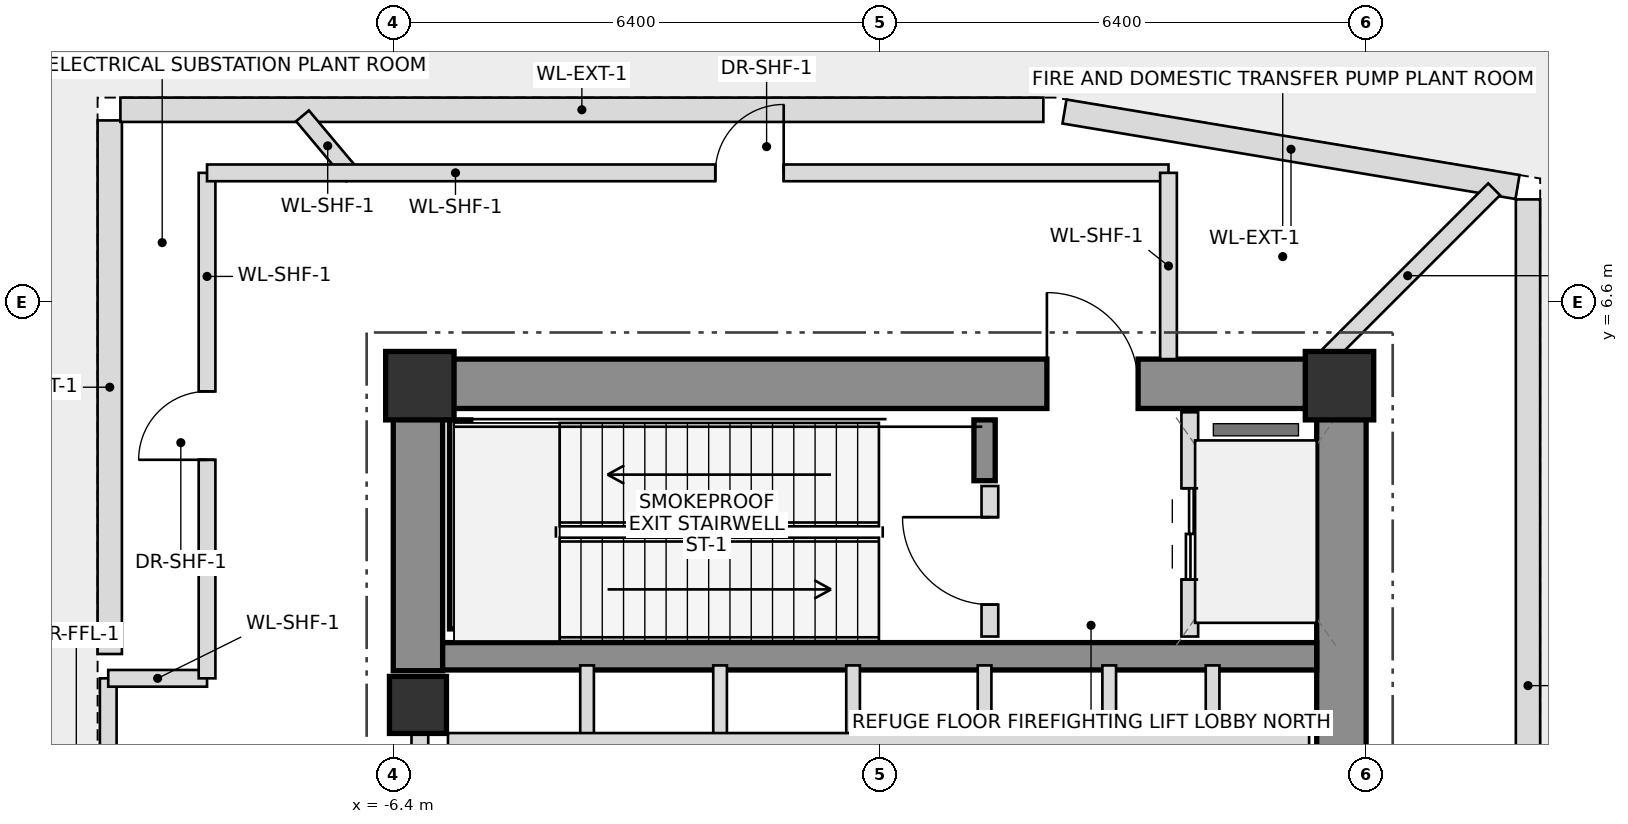
"""IFC4 building model, lengths in metres.
Left out: names, types, materials, properties, quantities, classifications, styles, units other than length and angle.
Written with IfcOpenShell. Run it as: python <this file> out.ifc"""

import sys

from ifc_helpers import new_model, si_unit, direction, frame, frame_2d, origin, origin_2d, place, context, subcontext, project, spatial, rectangle, extrude, source, transform, mapped, element, fill, save


model = new_model("IFC4")
c1 = context("Model", 3, precision=1e-05, world=origin(), true_north=direction((0.0, 1.0)))
c2 = subcontext(c1, "Body", "Model", "MODEL_VIEW")
j1 = project(units=[si_unit("LENGTHUNIT", "METRE"), si_unit("PLANEANGLEUNIT", "RADIAN")], contexts=[c1])
p1 = place(None, origin())
s1 = spatial("IfcSite", under=j1, at=p1, CompositionType="ELEMENT")
p2 = place(p1, origin())
s2 = spatial("IfcBuilding", under=s1, at=p2, CompositionType="ELEMENT")
p3 = place(p2, frame((0.0, 0.0, 119.9)))
s3 = spatial("IfcBuildingStorey", under=s2, at=p3, CompositionType="ELEMENT", Elevation=119.9)
m1 = source(origin(), c2, "Body", "SweptSolid", [
    extrude(rectangle(XDim=0.9, YDim=0.9, at=origin_2d()), origin(), (0.0, 0.0, 1.0), 5.1),
])
for number, where, z_axis, x_axis in (
    (1, (6.05, 5.5, 0.0), (0.0, 0.0, 1.0), (1.0, 0.0, 0.0)),
    (2, (-6.05, 5.5, 0.0), (0.0, 0.0, 1.0), (1.0, 0.0, 0.0)),
):
    element("IfcColumn", number, at=place(p3, frame(where, z_axis=z_axis, x_axis=x_axis)), inside=s3, PredefinedType="COLUMN", context=c2, shape_type="MappedRepresentation", body=[
        mapped(m1, transform((0.0, 0.0, 0.0), scale=1.0)),
    ])
p4 = place(p3, frame((-6.4, 5.525, 0.0), z_axis=(0.0, 0.0, 1.0), x_axis=(1.0, 0.0, 0.0)))
e3 = element("IfcWall", 3, at=p4, inside=s3, PredefinedType="SHEAR", context=c2, shape_type="SweptSolid", body=[
    extrude(rectangle(XDim=12.8, YDim=0.65, at=frame_2d((6.4, 0.0))), origin(), (0.0, 0.0, 1.0), 5.1),
])
p5 = place(p4, frame((8.6, 0.0, 0.0)))
e4 = element("IfcOpeningElement", 4, at=p5, cuts=e3, PredefinedType="OPENING", context=c2, shape_type="SweptSolid", body=[
    extrude(rectangle(XDim=1.2, YDim=2.2, at=frame_2d((0.6, 1.1))), frame((0.0, 0.335, 0.0), z_axis=(0.0, -1.0, 0.0), x_axis=(1.0, 0.0, 0.0)), (0.0, 0.0, 1.0), 0.67),
])
p6 = place(p3, frame((6.075, -5.2, 0.0), z_axis=(0.0, 0.0, 1.0), x_axis=(0.0, 1.0, 0.0)))
e5 = element("IfcWall", 5, at=p6, inside=s3, PredefinedType="SHEAR", context=c2, shape_type="SweptSolid", body=[
    extrude(rectangle(XDim=10.4, YDim=0.65, at=frame_2d((5.2, 0.0))), origin(), (0.0, 0.0, 1.0), 5.1),
])
p7 = place(p3, frame((-6.075, 1.75, 0.0), z_axis=(0.0, 0.0, 1.0), x_axis=(0.0, 1.0, 0.0)))
e6 = element("IfcWall", 6, at=p7, inside=s3, PredefinedType="SHEAR", context=c2, shape_type="SweptSolid", body=[
    extrude(rectangle(XDim=3.45, YDim=0.65, at=frame_2d((1.725, 0.0))), origin(), (0.0, 0.0, 1.0), 5.1),
])
p8 = place(p3, frame((-5.75, 1.94, 0.0), z_axis=(0.0, 0.0, 1.0), x_axis=(1.0, 0.0, 0.0)))
e7 = element("IfcWall", 7, at=p8, inside=s3, PredefinedType="SHEAR", context=c2, shape_type="SweptSolid", body=[
    extrude(rectangle(XDim=11.5, YDim=0.36, at=frame_2d((5.75, 0.0))), origin(), (0.0, 0.0, 1.0), 5.1),
])
p9 = place(p3, frame((-5.52, 2.3, 0.0), z_axis=(0.0, 0.0, 1.0), x_axis=(0.0, 1.0, 0.0)))
e8 = element("IfcWall", 8, at=p9, inside=s3, PredefinedType="SHEAR", context=c2, shape_type="SweptSolid", body=[
    extrude(rectangle(XDim=2.75, YDim=0.28, at=frame_2d((1.375, 0.0))), origin(), (0.0, 0.0, 1.0), 5.1),
])
p10 = place(p3, frame((1.38, 4.25, 0.0), z_axis=(0.0, 0.0, 1.0), x_axis=(0.0, 1.0, 0.0)))
e9 = element("IfcWall", 9, at=p10, inside=s3, PredefinedType="SHEAR", context=c2, shape_type="SweptSolid", body=[
    extrude(rectangle(XDim=0.8, YDim=0.28, at=frame_2d((0.4, 0.0))), origin(), (0.0, 0.0, 1.0), 5.1),
])
m2 = source(origin(), c2, "Body", "SweptSolid", [
    extrude(rectangle(XDim=0.75, YDim=0.75, at=origin_2d()), origin(), (0.0, 0.0, 1.0), 5.1),
])
p11 = place(p3, frame((-6.075, 1.3, 0.0), z_axis=(0.0, 0.0, 1.0), x_axis=(1.0, 0.0, 0.0)))
e10 = element("IfcColumn", 10, at=p11, inside=s3, PredefinedType="COLUMN", context=c2, shape_type="MappedRepresentation", body=[
    mapped(m2, transform((0.0, 0.0, 0.0), scale=1.0)),
])
p12 = place(p3, frame((-6.05, -0.95, 0.0), z_axis=(0.0, 0.0, 1.0), x_axis=(0.0, 1.0, 0.0)))
e11 = element("IfcWall", 11, at=p12, inside=s3, PredefinedType="PLUMBINGWALL", context=c2, shape_type="SweptSolid", body=[
    extrude(rectangle(XDim=1.9, YDim=0.22, at=frame_2d((0.95, 0.0))), origin(), (0.0, 0.0, 1.0), 3.88),
])
p13 = place(p12, frame((0.35, 0.0, 0.0)))
e12 = element("IfcOpeningElement", 12, at=p13, cuts=e11, PredefinedType="OPENING", context=c2, shape_type="SweptSolid", body=[
    extrude(rectangle(XDim=1.2, YDim=2.2, at=frame_2d((0.6, 1.1))), frame((0.0, 0.12, 0.0), z_axis=(0.0, -1.0, 0.0), x_axis=(1.0, 0.0, 0.0)), (0.0, 0.0, 1.0), 0.24),
])
p14 = place(p3, frame((1.45, 2.2, 0.0), z_axis=(0.0, 0.0, 1.0), x_axis=(0.0, 1.0, 0.0)))
e13 = element("IfcWall", 13, at=p14, inside=s3, PredefinedType="PLUMBINGWALL", context=c2, shape_type="SweptSolid", body=[
    extrude(rectangle(XDim=1.98, YDim=0.22, at=frame_2d((0.99, 0.0))), origin(), (0.0, 0.0, 1.0), 4.9),
])
p15 = place(p14, frame((0.42, 0.0, 0.0)))
e14 = element("IfcOpeningElement", 14, at=p15, cuts=e13, PredefinedType="OPENING", context=c2, shape_type="SweptSolid", body=[
    extrude(rectangle(XDim=1.15, YDim=2.15, at=frame_2d((0.575, 1.075))), frame((0.0, 0.12, 0.0), z_axis=(0.0, -1.0, 0.0), x_axis=(1.0, 0.0, 0.0)), (0.0, 0.0, 1.0), 0.24),
])
p16 = place(p3, frame((4.08, 2.2, 0.0), z_axis=(0.0, 0.0, 1.0), x_axis=(0.0, 1.0, 0.0)))
e15 = element("IfcWall", 15, at=p16, inside=s3, PredefinedType="PLUMBINGWALL", context=c2, shape_type="SweptSolid", body=[
    extrude(rectangle(XDim=2.95, YDim=0.22, at=frame_2d((1.475, 0.0))), origin(), (0.0, 0.0, 1.0), 4.9),
])
p17 = place(p16, frame((0.75, 0.0, 0.0)))
e16 = element("IfcOpeningElement", 16, at=p17, cuts=e15, PredefinedType="OPENING", context=c2, shape_type="SweptSolid", body=[
    extrude(rectangle(XDim=1.2, YDim=2.25, at=frame_2d((0.6, 1.125))), frame((0.0, 0.12, 0.0), z_axis=(0.0, -1.0, 0.0), x_axis=(1.0, 0.0, 0.0)), (0.0, 0.0, 1.0), 0.24),
])
for number, where, z_axis, x_axis in (
    (17, (-3.85, 0.84, 0.0), (0.0, 0.0, 1.0), (0.0, 1.0, 0.0)),
    (18, (-2.1, 0.84, 0.0), (0.0, 0.0, 1.0), (0.0, 1.0, 0.0)),
    (19, (-0.35, 0.84, 0.0), (0.0, 0.0, 1.0), (0.0, 1.0, 0.0)),
    (20, (1.38, 0.84, 0.0), (0.0, 0.0, 1.0), (0.0, 1.0, 0.0)),
    (21, (3.02, 0.84, 0.0), (0.0, 0.0, 1.0), (0.0, 1.0, 0.0)),
    (22, (4.38, 0.84, 0.0), (0.0, 0.0, 1.0), (0.0, 1.0, 0.0)),
):
    element("IfcWall", number, at=place(p3, frame(where, z_axis=z_axis, x_axis=x_axis)), inside=s3, PredefinedType="PLUMBINGWALL", context=c2, shape_type="SweptSolid", body=[
        extrude(rectangle(XDim=0.98, YDim=0.18, at=frame_2d((0.49, 0.0))), origin(), (0.0, 0.0, 1.0), 4.9),
    ])
p18 = place(p3, frame((-5.68, 0.84, 0.0), z_axis=(0.0, 0.0, 1.0), x_axis=(1.0, 0.0, 0.0)))
e23 = element("IfcWall", 23, at=p18, inside=s3, PredefinedType="PLUMBINGWALL", context=c2, shape_type="SweptSolid", body=[
    extrude(rectangle(XDim=11.33, YDim=0.18, at=frame_2d((5.665, 0.0))), origin(), (0.0, 0.0, 1.0), 4.9),
])
p19 = place(p3, frame((-10.13, 1.97, 0.0), z_axis=(0.0, 0.0, 1.0), x_axis=(0.0, 1.0, 0.0)))
e24 = element("IfcWall", 24, at=p19, inside=s3, PredefinedType="SOLIDWALL", context=c2, shape_type="SweptSolid", body=[
    extrude(rectangle(XDim=7.02, YDim=0.32, at=frame_2d((3.51, 0.0))), origin(), (0.0, 0.0, 1.0), 4.9),
])
p20 = place(p3, frame((-9.99, 9.13, 0.0), z_axis=(0.0, 0.0, 1.0), x_axis=(1.0, 0.0, 0.0)))
e25 = element("IfcWall", 25, at=p20, inside=s3, PredefinedType="SOLIDWALL", context=c2, shape_type="SweptSolid", body=[
    extrude(rectangle(XDim=12.144, YDim=0.32, at=frame_2d((6.072, 0.0))), origin(), (0.0, 0.0, 1.0), 3.555),
])
p21 = place(p3, frame((2.432, 9.107, 0.0), z_axis=(0.0, 0.0, 1.0), x_axis=(0.98639938338, -0.164366226666, 0.0)))
e26 = element("IfcWall", 26, at=p21, inside=s3, PredefinedType="SOLIDWALL", context=c2, shape_type="SweptSolid", body=[
    extrude(rectangle(XDim=6.042, YDim=0.32, at=frame_2d((3.021, 0.0))), origin(), (0.0, 0.0, 1.0), 3.555),
])
p22 = place(p3, frame((8.53, 7.951, 0.0), z_axis=(0.0, 0.0, 1.0), x_axis=(0.0, -1.0, 0.0)))
e27 = element("IfcWall", 27, at=p22, inside=s3, PredefinedType="SOLIDWALL", context=c2, shape_type="SweptSolid", body=[
    extrude(rectangle(XDim=12.794, YDim=0.32, at=frame_2d((6.397, 0.0))), origin(), (0.0, 0.0, 1.0), 3.555),
])
p23 = place(p3, frame((5.81, 5.81, 0.0), z_axis=(0.0, 0.0, 1.0), x_axis=(0.707106781187, 0.707106781187, 0.0)))
e28 = element("IfcWall", 28, at=p23, inside=s3, PredefinedType="PLUMBINGWALL", context=c2, shape_type="SweptSolid", body=[
    extrude(rectangle(XDim=3.216, YDim=0.22, at=frame_2d((1.608, 0.0))), origin(), (0.0, 0.0, 1.0), 3.555),
])
p24 = place(p3, frame((-6.931, 8.26, 0.0), z_axis=(0.0, 0.0, 1.0), x_axis=(-0.642881168458, 0.765965928251, 0.0)))
e29 = element("IfcWall", 29, at=p24, inside=s3, PredefinedType="PLUMBINGWALL", context=c2, shape_type="SweptSolid", body=[
    extrude(rectangle(XDim=1.031, YDim=0.22, at=frame_2d((0.516, 0.0))), origin(), (0.0, 0.0, 1.0), 4.9),
])
p25 = place(p3, frame((-10.15, -1.65, 0.0), z_axis=(0.0, 0.0, 1.0), x_axis=(0.0, 1.0, 0.0)))
e30 = element("IfcWall", 30, at=p25, inside=s3, PredefinedType="PLUMBINGWALL", context=c2, shape_type="SweptSolid", body=[
    extrude(rectangle(XDim=3.3, YDim=0.22, at=frame_2d((1.65, 0.0))), origin(), (0.0, 0.0, 1.0), 4.9),
])
p26 = place(p25, frame((1.05, 0.0, 0.0)))
e31 = element("IfcOpeningElement", 31, at=p26, cuts=e30, PredefinedType="OPENING", context=c2, shape_type="SweptSolid", body=[
    extrude(rectangle(XDim=1.2, YDim=2.2, at=frame_2d((0.6, 1.1))), frame((0.0, 0.12, 0.0), z_axis=(0.0, -1.0, 0.0), x_axis=(1.0, 0.0, 0.0)), (0.0, 0.0, 1.0), 0.24),
])
p27 = place(p3, frame((-10.15, 1.65, 0.0), z_axis=(0.0, 0.0, 1.0), x_axis=(1.0, 0.0, 0.0)))
e32 = element("IfcWall", 32, at=p27, inside=s3, PredefinedType="PLUMBINGWALL", context=c2, shape_type="SweptSolid", body=[
    extrude(rectangle(XDim=1.3, YDim=0.22, at=frame_2d((0.65, 0.0))), origin(), (0.0, 0.0, 1.0), 4.9),
])
p28 = place(p3, frame((-8.85, 1.65, 0.0), z_axis=(0.0, 0.0, 1.0), x_axis=(0.0, 1.0, 0.0)))
e33 = element("IfcWall", 33, at=p28, inside=s3, PredefinedType="PLUMBINGWALL", context=c2, shape_type="SweptSolid", body=[
    extrude(rectangle(XDim=6.65, YDim=0.22, at=frame_2d((3.325, 0.0))), origin(), (0.0, 0.0, 1.0), 4.9),
])
p29 = place(p28, frame((2.875, 0.0, 0.0)))
e34 = element("IfcOpeningElement", 34, at=p29, cuts=e33, PredefinedType="OPENING", context=c2, shape_type="SweptSolid", body=[
    extrude(rectangle(XDim=0.9, YDim=2.05, at=frame_2d((0.45, 1.025))), frame((0.0, 0.12, 0.0), z_axis=(0.0, -1.0, 0.0), x_axis=(1.0, 0.0, 0.0)), (0.0, 0.0, 1.0), 0.24),
])
p30 = place(p3, frame((-8.85, 8.3, 0.0), z_axis=(0.0, 0.0, 1.0), x_axis=(1.0, 0.0, 0.0)))
e35 = element("IfcWall", 35, at=p30, inside=s3, PredefinedType="PLUMBINGWALL", context=c2, shape_type="SweptSolid", body=[
    extrude(rectangle(XDim=12.65, YDim=0.22, at=frame_2d((6.325, 0.0))), origin(), (0.0, 0.0, 1.0), 3.555),
])
p31 = place(p30, frame((6.687, 0.0, 0.0)))
e36 = element("IfcOpeningElement", 36, at=p31, cuts=e35, PredefinedType="OPENING", context=c2, shape_type="SweptSolid", body=[
    extrude(rectangle(XDim=0.9, YDim=2.05, at=frame_2d((0.45, 1.025))), frame((0.0, 0.12, 0.0), z_axis=(0.0, -1.0, 0.0), x_axis=(1.0, 0.0, 0.0)), (0.0, 0.0, 1.0), 0.24),
])
p32 = place(p3, frame((3.8, 8.3, 0.0), z_axis=(0.0, 0.0, 1.0), x_axis=(0.0, -1.0, 0.0)))
e37 = element("IfcWall", 37, at=p32, inside=s3, PredefinedType="PLUMBINGWALL", context=c2, shape_type="SweptSolid", body=[
    extrude(rectangle(XDim=2.45, YDim=0.22, at=frame_2d((1.225, 0.0))), origin(), (0.0, 0.0, 1.0), 4.9),
])
p33 = place(p5, origin())
e38 = element("IfcDoor", 38, at=p33, inside=s3, OperationType="SINGLE_SWING_LEFT", PredefinedType="DOOR", context=c2, shape_type="SweptSolid", body=[
    extrude(rectangle(XDim=1.2, YDim=2.2, at=frame_2d((0.6, 1.1))), frame((0.0, 0.025, 0.0), z_axis=(0.0, -1.0, 0.0), x_axis=(1.0, 0.0, 0.0)), (0.0, 0.0, 1.0), 0.05),
])
fill(e4, e38)
p34 = place(p15, origin())
e39 = element("IfcDoor", 39, at=p34, inside=s3, OperationType="SINGLE_SWING_RIGHT", PredefinedType="DOOR", context=c2, shape_type="SweptSolid", body=[
    extrude(rectangle(XDim=1.15, YDim=2.15, at=frame_2d((0.575, 1.075))), frame((0.0, 0.025, 0.0), z_axis=(0.0, -1.0, 0.0), x_axis=(1.0, 0.0, 0.0)), (0.0, 0.0, 1.0), 0.05),
])
fill(e14, e39)
p35 = place(p17, origin())
e40 = element("IfcDoor", 40, at=p35, inside=s3, OperationType="DOUBLE_DOOR_SLIDING", PredefinedType="DOOR", context=c2, shape_type="SweptSolid", body=[
    extrude(rectangle(XDim=1.2, YDim=2.25, at=frame_2d((0.6, 1.125))), frame((0.0, 0.025, 0.0), z_axis=(0.0, -1.0, 0.0), x_axis=(1.0, 0.0, 0.0)), (0.0, 0.0, 1.0), 0.05),
])
fill(e16, e40)
p36 = place(p29, origin())
e41 = element("IfcDoor", 41, at=p36, inside=s3, OperationType="SINGLE_SWING_LEFT", PredefinedType="DOOR", context=c2, shape_type="SweptSolid", body=[
    extrude(rectangle(XDim=0.9, YDim=2.05, at=frame_2d((0.45, 1.025))), frame((0.0, 0.025, 0.0), z_axis=(0.0, -1.0, 0.0), x_axis=(1.0, 0.0, 0.0)), (0.0, 0.0, 1.0), 0.05),
])
fill(e34, e41)
p37 = place(p31, origin())
e42 = element("IfcDoor", 42, at=p37, inside=s3, OperationType="SINGLE_SWING_RIGHT", PredefinedType="DOOR", context=c2, shape_type="SweptSolid", body=[
    extrude(rectangle(XDim=0.9, YDim=2.05, at=frame_2d((0.45, 1.025))), frame((0.0, 0.025, 0.0), z_axis=(0.0, -1.0, 0.0), x_axis=(1.0, 0.0, 0.0)), (0.0, 0.0, 1.0), 0.05),
])
fill(e36, e42)
save(model, sys.argv[1])
